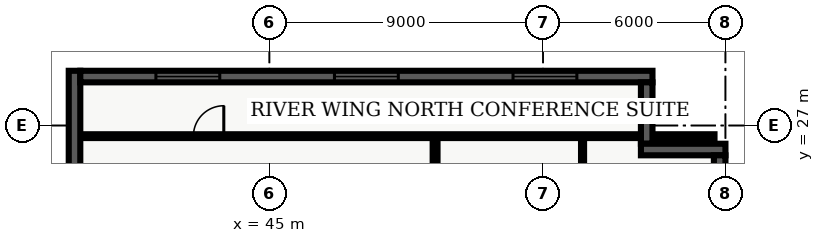
"""IFC4 building model, lengths in metres.
Left out: names, types, materials, properties, quantities, classifications, styles, units other than length and angle.
Written with IfcOpenShell. Run it as: python <this file> out.ifc"""

import sys

from ifc_helpers import new_model, entity, si_unit, converted_unit, direction, frame, origin_with_axes, origin_2d_with_axis, place, context, subcontext, project, spatial, polyline, rectangle, outline, extrude, element, fill, save


model = new_model("IFC4")
c1 = context("Model", 3, precision=1e-05, world=origin_with_axes(), true_north=direction((0.0, 1.0)))
c2 = subcontext(c1, "Body", "Model", "MODEL_VIEW")
j1 = project(units=[si_unit("LENGTHUNIT", "METRE"), converted_unit("PLANEANGLEUNIT", "DEGREE", entity("IfcPlaneAngleMeasure", 0.017), si_unit("PLANEANGLEUNIT", "RADIAN"), dimensions=[0, 0, 0, 0, 0, 0, 0])], contexts=[c1])
p1 = place(None, origin_with_axes())
s1 = spatial("IfcSite", under=j1, at=p1, CompositionType="ELEMENT")
p2 = place(p1, origin_with_axes())
s2 = spatial("IfcBuilding", under=s1, at=p2, CompositionType="ELEMENT")
p3 = place(p2, frame((0.0, 0.0, 67.8), z_axis=(0.0, 0.0, 1.0), x_axis=(1.0, 0.0, 0.0)))
s3 = spatial("IfcBuildingStorey", under=s2, at=p3, CompositionType="ELEMENT", Elevation=67.8)
p4 = place(p3, frame((50.45, 7.85, 0.0), z_axis=(0.0, 0.0, 1.0), x_axis=(0.0, 1.0, 0.0)))
e1 = element("IfcWall", 1, at=p4, inside=s3, PredefinedType="PARTITIONING", context=c2, shape_type="SweptSolid", body=[
    extrude(outline(polyline([(0.0, -0.08), (18.8, -0.08), (18.8, 0.08), (0.0, 0.08), (0.0, -0.08)])), origin_with_axes(), (0.0, 0.0, 1.0), 2.7),
])
p5 = place(p4, frame((4.405, 0.0, 0.0), z_axis=(0.0, 0.0, 1.0), x_axis=(1.0, 0.0, 0.0)))
e2 = element("IfcOpeningElement", 2, at=p5, cuts=e1, PredefinedType="OPENING", context=c2, shape_type="SweptSolid", body=[
    extrude(rectangle(XDim=1.0, YDim=0.18, at=origin_2d_with_axis()), origin_with_axes(), (0.0, 0.0, 1.0), 2.15),
])
p6 = place(p4, frame((13.465, 0.0, 0.0), z_axis=(0.0, 0.0, 1.0), x_axis=(1.0, 0.0, 0.0)))
e3 = element("IfcOpeningElement", 3, at=p6, cuts=e1, PredefinedType="OPENING", context=c2, shape_type="SweptSolid", body=[
    extrude(rectangle(XDim=1.0, YDim=0.18, at=origin_2d_with_axis()), origin_with_axes(), (0.0, 0.0, 1.0), 2.15),
])
p7 = place(p3, frame((38.76, 26.65, 0.0), z_axis=(0.0, 0.0, 1.0), x_axis=(1.0, 0.0, 0.0)))
e4 = element("IfcWall", 4, at=p7, inside=s3, PredefinedType="PARTITIONING", context=c2, shape_type="SweptSolid", body=[
    extrude(outline(polyline([(0.0, -0.062), (20.88, -0.062), (20.88, 0.062), (0.0, 0.062), (0.0, -0.062)])), origin_with_axes(), (0.0, 0.0, 1.0), 2.7),
])
p8 = place(p7, frame((4.24, 0.0, 0.0), z_axis=(0.0, 0.0, 1.0), x_axis=(1.0, 0.0, 0.0)))
e5 = element("IfcOpeningElement", 5, at=p8, cuts=e4, PredefinedType="OPENING", context=c2, shape_type="SweptSolid", body=[
    extrude(rectangle(XDim=1.0, YDim=0.145, at=origin_2d_with_axis()), origin_with_axes(), (0.0, 0.0, 1.0), 2.15),
])
p9 = place(p3, frame((55.3, 7.98, 0.0), z_axis=(0.0, 0.0, 1.0), x_axis=(0.0, 1.0, 0.0)))
e6 = element("IfcWall", 6, at=p9, inside=s3, PredefinedType="PARTITIONING", context=c2, shape_type="SweptSolid", body=[
    extrude(outline(polyline([(0.0, -0.05), (18.54, -0.05), (18.54, 0.05), (0.0, 0.05), (0.0, -0.05)])), origin_with_axes(), (0.0, 0.0, 1.0), 2.7),
])
p10 = place(p9, frame((3.995, 0.0, 0.0), z_axis=(0.0, 0.0, 1.0), x_axis=(1.0, 0.0, 0.0)))
e7 = element("IfcOpeningElement", 7, at=p10, cuts=e6, PredefinedType="OPENING", context=c2, shape_type="SweptSolid", body=[
    extrude(rectangle(XDim=0.95, YDim=0.12, at=origin_2d_with_axis()), origin_with_axes(), (0.0, 0.0, 1.0), 2.15),
])
p11 = place(p9, frame((13.335, 0.0, 0.0), z_axis=(0.0, 0.0, 1.0), x_axis=(1.0, 0.0, 0.0)))
e8 = element("IfcOpeningElement", 8, at=p11, cuts=e6, PredefinedType="OPENING", context=c2, shape_type="SweptSolid", body=[
    extrude(rectangle(XDim=0.95, YDim=0.12, at=origin_2d_with_axis()), origin_with_axes(), (0.0, 0.0, 1.0), 2.15),
])
p12 = place(p3, frame((38.59, 21.22, 0.0), z_axis=(0.0, 0.0, 1.0), x_axis=(0.0, 1.0, 0.0)))
e9 = element("IfcWall", 9, at=p12, inside=s3, PredefinedType="SOLIDWALL", context=c2, shape_type="SweptSolid", body=[
    extrude(outline(polyline([(0.0, -0.19), (7.58, -0.19), (7.58, 0.19), (0.0, 0.19), (0.0, -0.19)])), origin_with_axes(), (0.0, 0.0, 1.0), 3.66),
])
p13 = place(p3, frame((38.78, 28.61, 0.0), z_axis=(0.0, 0.0, 1.0), x_axis=(1.0, 0.0, 0.0)))
e10 = element("IfcWall", 10, at=p13, inside=s3, PredefinedType="SOLIDWALL", context=c2, shape_type="SweptSolid", body=[
    extrude(outline(polyline([(0.0, -0.19), (18.82, -0.19), (18.82, 0.19), (0.0, 0.19), (0.0, -0.19)])), origin_with_axes(), (0.0, 0.0, 1.0), 3.66),
])
p14 = place(p13, frame((3.537, 0.0, 0.45), z_axis=(0.0, 0.0, 1.0), x_axis=(1.0, 0.0, 0.0)))
e11 = element("IfcOpeningElement", 11, at=p14, cuts=e10, PredefinedType="OPENING", context=c2, shape_type="SweptSolid", body=[
    extrude(rectangle(XDim=2.1, YDim=0.4, at=origin_2d_with_axis()), origin_with_axes(), (0.0, 0.0, 1.0), 2.2),
])
p15 = place(p13, frame((9.41, 0.0, 0.45), z_axis=(0.0, 0.0, 1.0), x_axis=(1.0, 0.0, 0.0)))
e12 = element("IfcOpeningElement", 12, at=p15, cuts=e10, PredefinedType="OPENING", context=c2, shape_type="SweptSolid", body=[
    extrude(rectangle(XDim=2.1, YDim=0.4, at=origin_2d_with_axis()), origin_with_axes(), (0.0, 0.0, 1.0), 2.2),
])
p16 = place(p13, frame((15.283, 0.0, 0.45), z_axis=(0.0, 0.0, 1.0), x_axis=(1.0, 0.0, 0.0)))
e13 = element("IfcOpeningElement", 13, at=p16, cuts=e10, PredefinedType="OPENING", context=c2, shape_type="SweptSolid", body=[
    extrude(rectangle(XDim=2.1, YDim=0.4, at=origin_2d_with_axis()), origin_with_axes(), (0.0, 0.0, 1.0), 2.2),
])
p17 = place(p3, frame((57.41, 28.42, 0.0), z_axis=(0.0, 0.0, 1.0), x_axis=(0.0, -1.0, 0.0)))
e14 = element("IfcWall", 14, at=p17, inside=s3, PredefinedType="SOLIDWALL", context=c2, shape_type="SweptSolid", body=[
    extrude(outline(polyline([(0.0, -0.19), (2.02, -0.19), (2.02, 0.19), (0.0, 0.19), (0.0, -0.19)])), origin_with_axes(), (0.0, 0.0, 1.0), 3.66),
])
p18 = place(p3, frame((57.22, 26.21, 0.0), z_axis=(0.0, 0.0, 1.0), x_axis=(1.0, 0.0, 0.0)))
e15 = element("IfcWall", 15, at=p18, inside=s3, PredefinedType="SOLIDWALL", context=c2, shape_type="SweptSolid", body=[
    extrude(outline(polyline([(0.0, -0.19), (2.78, -0.19), (2.78, 0.19), (0.0, 0.19), (0.0, -0.19)])), origin_with_axes(), (0.0, 0.0, 1.0), 3.66),
])
p19 = place(p3, frame((59.81, 26.02, 0.0), z_axis=(0.0, 0.0, 1.0), x_axis=(0.0, -1.0, 0.0)))
e16 = element("IfcWall", 16, at=p19, inside=s3, PredefinedType="SOLIDWALL", context=c2, shape_type="SweptSolid", body=[
    extrude(outline(polyline([(0.0, -0.19), (23.62, -0.19), (23.62, 0.19), (0.0, 0.19), (0.0, -0.19)])), origin_with_axes(), (0.0, 0.0, 1.0), 3.66),
])
p20 = place(p19, frame((3.853, 0.0, 0.45), z_axis=(0.0, 0.0, 1.0), x_axis=(1.0, 0.0, 0.0)))
e17 = element("IfcOpeningElement", 17, at=p20, cuts=e16, PredefinedType="OPENING", context=c2, shape_type="SweptSolid", body=[
    extrude(rectangle(XDim=2.1, YDim=0.4, at=origin_2d_with_axis()), origin_with_axes(), (0.0, 0.0, 1.0), 2.2),
])
p21 = place(p19, frame((20.218, 0.0, 0.45), z_axis=(0.0, 0.0, 1.0), x_axis=(1.0, 0.0, 0.0)))
e18 = element("IfcOpeningElement", 18, at=p21, cuts=e16, PredefinedType="OPENING", context=c2, shape_type="SweptSolid", body=[
    extrude(rectangle(XDim=2.1, YDim=0.4, at=origin_2d_with_axis()), origin_with_axes(), (0.0, 0.0, 1.0), 2.2),
])
p22 = place(p7, frame((4.24, 0.0, 0.0), z_axis=(0.0, 0.0, 1.0), x_axis=(1.0, 0.0, 0.0)))
e19 = element("IfcDoor", 19, at=p22, inside=s3, OperationType="SINGLE_SWING_RIGHT", PredefinedType="DOOR", context=c2, shape_type="SweptSolid", body=[
    extrude(rectangle(XDim=1.0, YDim=0.075, at=origin_2d_with_axis()), origin_with_axes(), (0.0, 0.0, 1.0), 2.15),
])
fill(e5, e19)
p23 = place(p13, frame((3.537, 0.0, 0.45), z_axis=(0.0, 0.0, 1.0), x_axis=(1.0, 0.0, 0.0)))
e20 = element("IfcWindow", 20, at=p23, inside=s3, PredefinedType="WINDOW", context=c2, shape_type="SweptSolid", body=[
    extrude(rectangle(XDim=2.1, YDim=0.09, at=origin_2d_with_axis()), origin_with_axes(), (0.0, 0.0, 1.0), 2.2),
])
fill(e11, e20)
p24 = place(p13, frame((9.41, 0.0, 0.45), z_axis=(0.0, 0.0, 1.0), x_axis=(1.0, 0.0, 0.0)))
e21 = element("IfcWindow", 21, at=p24, inside=s3, PredefinedType="WINDOW", context=c2, shape_type="SweptSolid", body=[
    extrude(rectangle(XDim=2.1, YDim=0.09, at=origin_2d_with_axis()), origin_with_axes(), (0.0, 0.0, 1.0), 2.2),
])
fill(e12, e21)
p25 = place(p13, frame((15.283, 0.0, 0.45), z_axis=(0.0, 0.0, 1.0), x_axis=(1.0, 0.0, 0.0)))
e22 = element("IfcWindow", 22, at=p25, inside=s3, PredefinedType="WINDOW", context=c2, shape_type="SweptSolid", body=[
    extrude(rectangle(XDim=2.1, YDim=0.09, at=origin_2d_with_axis()), origin_with_axes(), (0.0, 0.0, 1.0), 2.2),
])
fill(e13, e22)
save(model, sys.argv[1])
